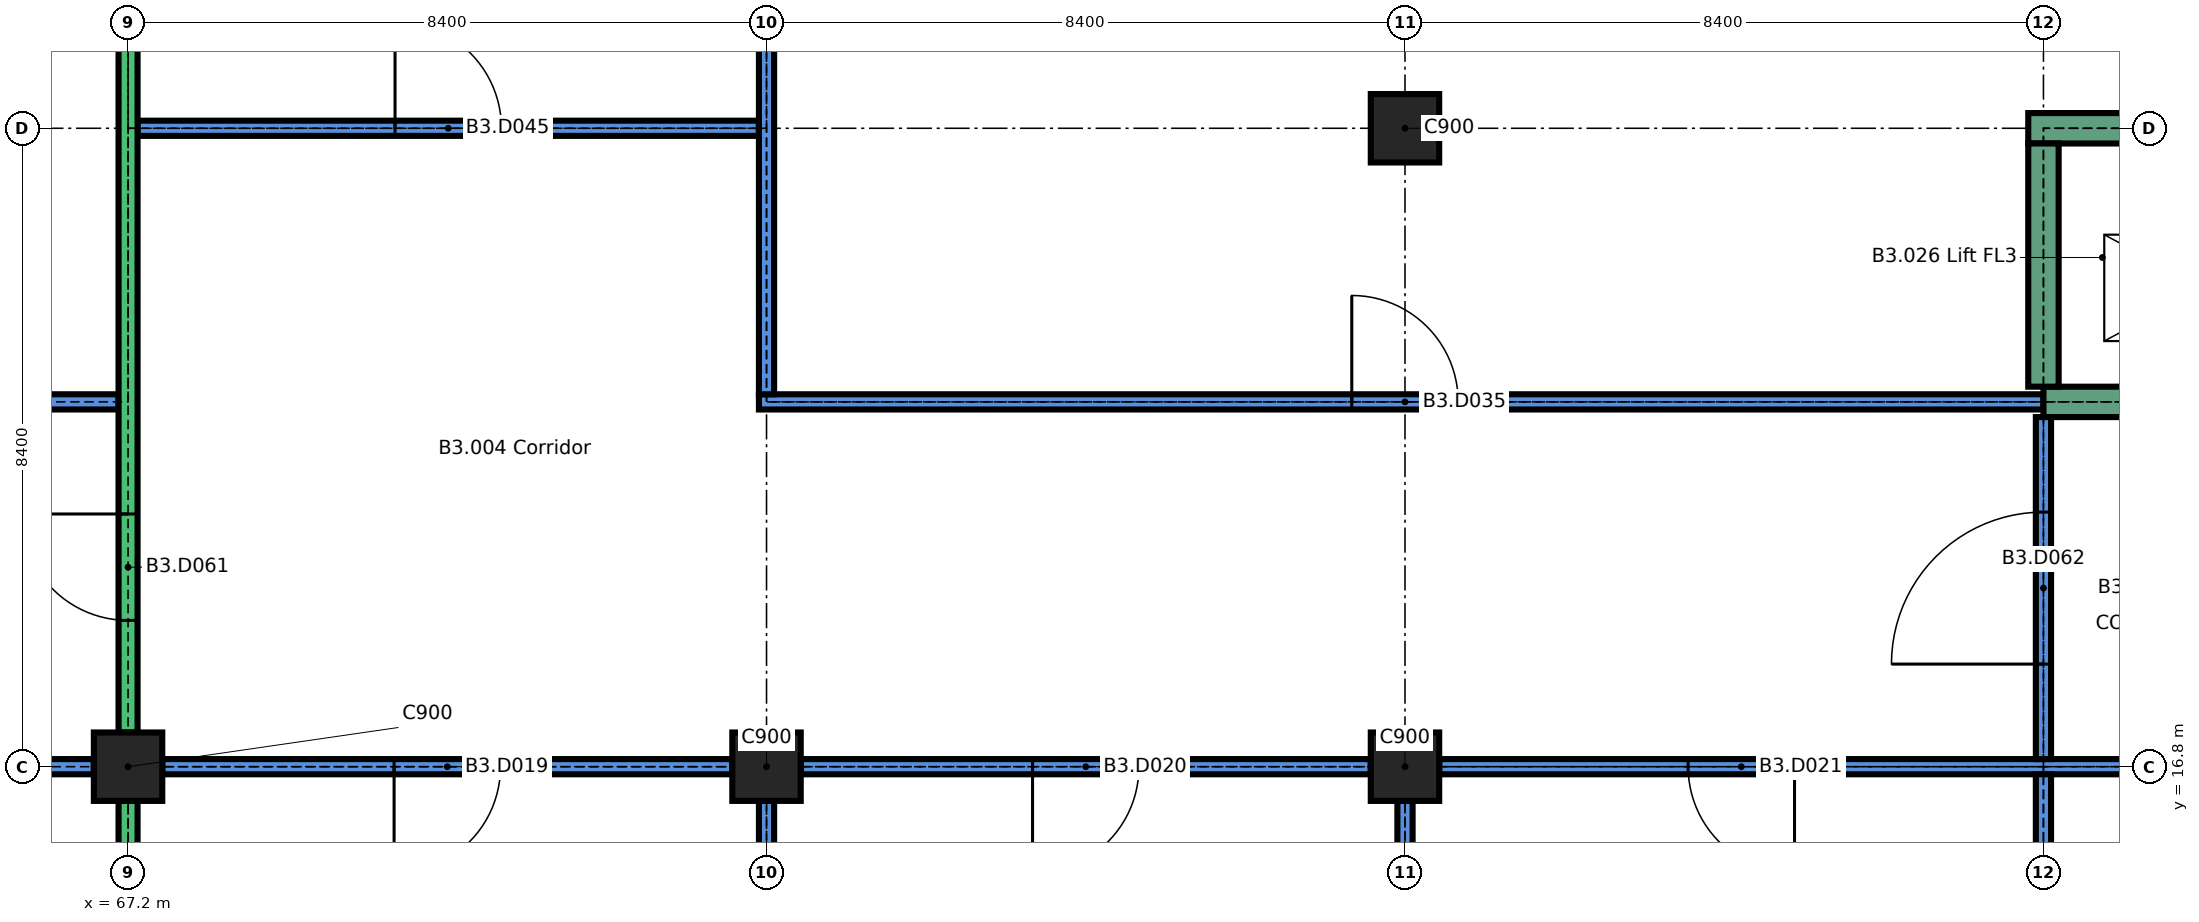
"""IFC4 building model, lengths in metres.
Left out: names, types, materials, properties, quantities, classifications, styles, units other than length and angle.
Written with IfcOpenShell. Run it as: python <this file> out.ifc"""

import sys

from ifc_helpers import new_model, si_unit, direction, frame, frame_2d, origin, origin_2d, place, context, subcontext, project, spatial, rectangle, extrude, element, fill, save


model = new_model("IFC4")
c1 = context("Model", 3, precision=1e-05, world=origin(), true_north=direction((0.0, 1.0)))
c2 = subcontext(c1, "Body", "Model", "MODEL_VIEW")
j1 = project(units=[si_unit("LENGTHUNIT", "METRE"), si_unit("PLANEANGLEUNIT", "RADIAN")], contexts=[c1])
p1 = place(None, origin())
s1 = spatial("IfcSite", under=j1, at=p1, CompositionType="ELEMENT")
p2 = place(p1, origin())
s2 = spatial("IfcBuilding", under=s1, at=p2, CompositionType="ELEMENT")
p3 = place(p2, frame((0.0, 0.0, -11.4)))
s3 = spatial("IfcBuildingStorey", under=s2, at=p3, CompositionType="ELEMENT", Elevation=-11.4)
for number, where, z_axis, x_axis in (
    (1, (67.2, 16.8, 0.0), (0.0, 0.0, 1.0), (1.0, 0.0, 0.0)),
    (2, (75.6, 16.8, 0.0), (0.0, 0.0, 1.0), (1.0, 0.0, 0.0)),
    (3, (84.0, 16.8, 0.0), (0.0, 0.0, 1.0), (1.0, 0.0, 0.0)),
    (4, (84.0, 25.2, 0.0), (0.0, 0.0, 1.0), (1.0, 0.0, 0.0)),
):
    element("IfcColumn", number, at=place(p3, frame(where, z_axis=z_axis, x_axis=x_axis)), inside=s3, PredefinedType="COLUMN", context=c2, shape_type="SweptSolid", body=[
        extrude(rectangle(XDim=0.9, YDim=0.9, at=origin_2d()), origin(), (0.0, 0.0, 1.0), 3.2),
    ])
p4 = place(p3, frame((59.25, 16.8, 0.0), z_axis=(0.0, 0.0, 1.0), x_axis=(1.0, 0.0, 0.0)))
e5 = element("IfcWall", 5, at=p4, inside=s3, PredefinedType="PARTITIONING", context=c2, shape_type="SweptSolid", body=[
    extrude(rectangle(XDim=7.5, YDim=0.2, at=frame_2d((3.75, 0.0))), origin(), (0.0, 0.0, 1.0), 3.2),
])
p5 = place(p4, frame((3.05, 0.0, 0.0)))
e6 = element("IfcOpeningElement", 6, at=p5, cuts=e5, PredefinedType="OPENING", context=c2, shape_type="SweptSolid", body=[
    extrude(rectangle(XDim=1.4, YDim=2.1, at=frame_2d((0.7, 1.05))), frame((0.0, 0.11, 0.0), z_axis=(0.0, -1.0, 0.0), x_axis=(1.0, 0.0, 0.0)), (0.0, 0.0, 1.0), 0.22),
])
p6 = place(p3, frame((67.65, 16.8, 0.0), z_axis=(0.0, 0.0, 1.0), x_axis=(1.0, 0.0, 0.0)))
e7 = element("IfcWall", 7, at=p6, inside=s3, PredefinedType="PARTITIONING", context=c2, shape_type="SweptSolid", body=[
    extrude(rectangle(XDim=7.5, YDim=0.2, at=frame_2d((3.75, 0.0))), origin(), (0.0, 0.0, 1.0), 3.2),
])
p7 = place(p6, frame((3.05, 0.0, 0.0)))
e8 = element("IfcOpeningElement", 8, at=p7, cuts=e7, PredefinedType="OPENING", context=c2, shape_type="SweptSolid", body=[
    extrude(rectangle(XDim=1.4, YDim=2.1, at=frame_2d((0.7, 1.05))), frame((0.0, 0.11, 0.0), z_axis=(0.0, -1.0, 0.0), x_axis=(1.0, 0.0, 0.0)), (0.0, 0.0, 1.0), 0.22),
])
p8 = place(p3, frame((76.05, 16.8, 0.0), z_axis=(0.0, 0.0, 1.0), x_axis=(1.0, 0.0, 0.0)))
e9 = element("IfcWall", 9, at=p8, inside=s3, PredefinedType="PARTITIONING", context=c2, shape_type="SweptSolid", body=[
    extrude(rectangle(XDim=7.5, YDim=0.2, at=frame_2d((3.75, 0.0))), origin(), (0.0, 0.0, 1.0), 3.2),
])
p9 = place(p8, frame((3.05, 0.0, 0.0)))
e10 = element("IfcOpeningElement", 10, at=p9, cuts=e9, PredefinedType="OPENING", context=c2, shape_type="SweptSolid", body=[
    extrude(rectangle(XDim=1.4, YDim=2.1, at=frame_2d((0.7, 1.05))), frame((0.0, 0.11, 0.0), z_axis=(0.0, -1.0, 0.0), x_axis=(1.0, 0.0, 0.0)), (0.0, 0.0, 1.0), 0.22),
])
p10 = place(p3, frame((84.45, 16.8, 0.0), z_axis=(0.0, 0.0, 1.0), x_axis=(1.0, 0.0, 0.0)))
e11 = element("IfcWall", 11, at=p10, inside=s3, PredefinedType="PARTITIONING", context=c2, shape_type="SweptSolid", body=[
    extrude(rectangle(XDim=15.9, YDim=0.2, at=frame_2d((7.95, 0.0))), origin(), (0.0, 0.0, 1.0), 3.2),
])
p11 = place(p10, frame((3.275, 0.0, 0.0)))
e12 = element("IfcOpeningElement", 12, at=p11, cuts=e11, PredefinedType="OPENING", context=c2, shape_type="SweptSolid", body=[
    extrude(rectangle(XDim=1.4, YDim=2.1, at=frame_2d((0.7, 1.05))), frame((0.0, 0.11, 0.0), z_axis=(0.0, -1.0, 0.0), x_axis=(1.0, 0.0, 0.0)), (0.0, 0.0, 1.0), 0.22),
])
p12 = place(p10, frame((13.325, 0.0, 0.0)))
e13 = element("IfcOpeningElement", 13, at=p12, cuts=e11, PredefinedType="OPENING", context=c2, shape_type="SweptSolid", body=[
    extrude(rectangle(XDim=1.4, YDim=2.1, at=frame_2d((0.7, 1.05))), frame((0.0, 0.11, 0.0), z_axis=(0.0, -1.0, 0.0), x_axis=(1.0, 0.0, 0.0)), (0.0, 0.0, 1.0), 0.22),
])
p13 = place(p3, frame((58.7, 21.6, 0.0), z_axis=(0.0, 0.0, 1.0), x_axis=(1.0, 0.0, 0.0)))
e14 = element("IfcWall", 14, at=p13, inside=s3, PredefinedType="PARTITIONING", context=c2, shape_type="SweptSolid", body=[
    extrude(rectangle(XDim=8.375, YDim=0.2, at=frame_2d((4.188, 0.0))), origin(), (0.0, 0.0, 1.0), 3.2),
])
p14 = place(p13, frame((3.538, 0.0, 0.0)))
e15 = element("IfcOpeningElement", 15, at=p14, cuts=e14, PredefinedType="OPENING", context=c2, shape_type="SweptSolid", body=[
    extrude(rectangle(XDim=1.4, YDim=2.1, at=frame_2d((0.7, 1.05))), frame((0.0, 0.11, 0.0), z_axis=(0.0, -1.0, 0.0), x_axis=(1.0, 0.0, 0.0)), (0.0, 0.0, 1.0), 0.22),
])
p15 = place(p3, frame((75.5, 21.6, 0.0), z_axis=(0.0, 0.0, 1.0), x_axis=(1.0, 0.0, 0.0)))
e16 = element("IfcWall", 16, at=p15, inside=s3, PredefinedType="PARTITIONING", context=c2, shape_type="SweptSolid", body=[
    extrude(rectangle(XDim=16.9, YDim=0.2, at=frame_2d((8.45, 0.0))), origin(), (0.0, 0.0, 1.0), 3.2),
])
p16 = place(p15, frame((7.8, 0.0, 0.0)))
e17 = element("IfcOpeningElement", 17, at=p16, cuts=e16, PredefinedType="OPENING", context=c2, shape_type="SweptSolid", body=[
    extrude(rectangle(XDim=1.4, YDim=2.1, at=frame_2d((0.7, 1.05))), frame((0.0, 0.11, 0.0), z_axis=(0.0, -1.0, 0.0), x_axis=(1.0, 0.0, 0.0)), (0.0, 0.0, 1.0), 0.22),
])
p17 = place(p3, frame((92.4, 21.6, 0.0), z_axis=(0.0, 0.0, 1.0), x_axis=(1.0, 0.0, 0.0)))
e18 = element("IfcWall", 18, at=p17, inside=s3, PredefinedType="SHEAR", context=c2, shape_type="SweptSolid", body=[
    extrude(rectangle(XDim=4.2, YDim=0.4, at=frame_2d((2.1, 0.0))), origin(), (0.0, 0.0, 1.0), 3.2),
])
p18 = place(p17, frame((1.55, 0.0, 0.0)))
e19 = element("IfcOpeningElement", 19, at=p18, cuts=e18, PredefinedType="OPENING", context=c2, shape_type="SweptSolid", body=[
    extrude(rectangle(XDim=1.1, YDim=2.1, at=frame_2d((0.55, 1.05))), frame((0.0, 0.21, 0.0), z_axis=(0.0, -1.0, 0.0), x_axis=(1.0, 0.0, 0.0)), (0.0, 0.0, 1.0), 0.42),
])
p19 = place(p3, frame((67.325, 25.2, 0.0), z_axis=(0.0, 0.0, 1.0), x_axis=(1.0, 0.0, 0.0)))
e20 = element("IfcWall", 20, at=p19, inside=s3, PredefinedType="PARTITIONING", context=c2, shape_type="SweptSolid", body=[
    extrude(rectangle(XDim=8.175, YDim=0.2, at=frame_2d((4.087, 0.0))), origin(), (0.0, 0.0, 1.0), 3.2),
])
p20 = place(p19, frame((3.387, 0.0, 0.0)))
e21 = element("IfcOpeningElement", 21, at=p20, cuts=e20, PredefinedType="OPENING", context=c2, shape_type="SweptSolid", body=[
    extrude(rectangle(XDim=1.4, YDim=2.1, at=frame_2d((0.7, 1.05))), frame((0.0, 0.11, 0.0), z_axis=(0.0, -1.0, 0.0), x_axis=(1.0, 0.0, 0.0)), (0.0, 0.0, 1.0), 0.22),
])
p21 = place(p3, frame((92.2, 25.2, 0.0), z_axis=(0.0, 0.0, 1.0), x_axis=(1.0, 0.0, 0.0)))
e22 = element("IfcWall", 22, at=p21, inside=s3, PredefinedType="SHEAR", context=c2, shape_type="SweptSolid", body=[
    extrude(rectangle(XDim=4.6, YDim=0.4, at=frame_2d((2.3, 0.0))), origin(), (0.0, 0.0, 1.0), 3.2),
])
p22 = place(p3, frame((67.2, 8.85, 0.0), z_axis=(0.0, 0.0, 1.0), x_axis=(0.0, 1.0, 0.0)))
e23 = element("IfcWall", 23, at=p22, inside=s3, PredefinedType="SOLIDWALL", context=c2, shape_type="SweptSolid", body=[
    extrude(rectangle(XDim=7.5, YDim=0.25, at=frame_2d((3.75, 0.0))), origin(), (0.0, 0.0, 1.0), 3.2),
])
p23 = place(p3, frame((67.2, 17.25, 0.0), z_axis=(0.0, 0.0, 1.0), x_axis=(0.0, 1.0, 0.0)))
e24 = element("IfcWall", 24, at=p23, inside=s3, PredefinedType="SOLIDWALL", context=c2, shape_type="SweptSolid", body=[
    extrude(rectangle(XDim=12.75, YDim=0.25, at=frame_2d((6.375, 0.0))), origin(), (0.0, 0.0, 1.0), 3.2),
])
p24 = place(p23, frame((1.475, 0.0, 0.0)))
e25 = element("IfcOpeningElement", 25, at=p24, cuts=e24, PredefinedType="OPENING", context=c2, shape_type="SweptSolid", body=[
    extrude(rectangle(XDim=1.4, YDim=2.1, at=frame_2d((0.7, 1.05))), frame((0.0, 0.135, 0.0), z_axis=(0.0, -1.0, 0.0), x_axis=(1.0, 0.0, 0.0)), (0.0, 0.0, 1.0), 0.27),
])
p25 = place(p3, frame((75.6, 8.85, 0.0), z_axis=(0.0, 0.0, 1.0), x_axis=(0.0, 1.0, 0.0)))
e26 = element("IfcWall", 26, at=p25, inside=s3, PredefinedType="PARTITIONING", context=c2, shape_type="SweptSolid", body=[
    extrude(rectangle(XDim=7.5, YDim=0.2, at=frame_2d((3.75, 0.0))), origin(), (0.0, 0.0, 1.0), 3.2),
])
p26 = place(p3, frame((75.6, 21.7, 0.0), z_axis=(0.0, 0.0, 1.0), x_axis=(0.0, 1.0, 0.0)))
e27 = element("IfcWall", 27, at=p26, inside=s3, PredefinedType="PARTITIONING", context=c2, shape_type="SweptSolid", body=[
    extrude(rectangle(XDim=8.3, YDim=0.2, at=frame_2d((4.15, 0.0))), origin(), (0.0, 0.0, 1.0), 3.2),
])
p27 = place(p3, frame((84.0, 8.85, 0.0), z_axis=(0.0, 0.0, 1.0), x_axis=(0.0, 1.0, 0.0)))
e28 = element("IfcWall", 28, at=p27, inside=s3, PredefinedType="PARTITIONING", context=c2, shape_type="SweptSolid", body=[
    extrude(rectangle(XDim=7.5, YDim=0.2, at=frame_2d((3.75, 0.0))), origin(), (0.0, 0.0, 1.0), 3.2),
])
p28 = place(p3, frame((92.4, 8.85, 0.0), z_axis=(0.0, 0.0, 1.0), x_axis=(0.0, 1.0, 0.0)))
e29 = element("IfcWall", 29, at=p28, inside=s3, PredefinedType="PARTITIONING", context=c2, shape_type="SweptSolid", body=[
    extrude(rectangle(XDim=7.85, YDim=0.2, at=frame_2d((3.925, 0.0))), origin(), (0.0, 0.0, 1.0), 3.2),
])
p29 = place(p3, frame((92.4, 16.9, 0.0), z_axis=(0.0, 0.0, 1.0), x_axis=(0.0, 1.0, 0.0)))
e30 = element("IfcWall", 30, at=p29, inside=s3, PredefinedType="PARTITIONING", context=c2, shape_type="SweptSolid", body=[
    extrude(rectangle(XDim=4.5, YDim=0.2, at=frame_2d((2.25, 0.0))), origin(), (0.0, 0.0, 1.0), 3.2),
])
p30 = place(p29, frame((1.25, 0.0, 0.0)))
e31 = element("IfcOpeningElement", 31, at=p30, cuts=e30, PredefinedType="OPENING", context=c2, shape_type="SweptSolid", body=[
    extrude(rectangle(XDim=2.0, YDim=2.4, at=frame_2d((1.0, 1.2))), frame((0.0, 0.11, 0.0), z_axis=(0.0, -1.0, 0.0), x_axis=(1.0, 0.0, 0.0)), (0.0, 0.0, 1.0), 0.22),
])
p31 = place(p3, frame((92.4, 21.8, 0.0), z_axis=(0.0, 0.0, 1.0), x_axis=(0.0, 1.0, 0.0)))
e32 = element("IfcWall", 32, at=p31, inside=s3, PredefinedType="SHEAR", context=c2, shape_type="SweptSolid", body=[
    extrude(rectangle(XDim=3.2, YDim=0.4, at=frame_2d((1.6, 0.0))), origin(), (0.0, 0.0, 1.0), 3.2),
])
p32 = place(p7, origin())
e33 = element("IfcDoor", 33, at=p32, inside=s3, OperationType="SINGLE_SWING_LEFT", PredefinedType="DOOR", context=c2, shape_type="SweptSolid", body=[
    extrude(rectangle(XDim=1.4, YDim=2.1, at=frame_2d((0.7, 1.05))), frame((0.0, 0.025, 0.0), z_axis=(0.0, -1.0, 0.0), x_axis=(1.0, 0.0, 0.0)), (0.0, 0.0, 1.0), 0.05),
])
fill(e8, e33)
p33 = place(p9, origin())
e34 = element("IfcDoor", 34, at=p33, inside=s3, OperationType="SINGLE_SWING_LEFT", PredefinedType="DOOR", context=c2, shape_type="SweptSolid", body=[
    extrude(rectangle(XDim=1.4, YDim=2.1, at=frame_2d((0.7, 1.05))), frame((0.0, 0.025, 0.0), z_axis=(0.0, -1.0, 0.0), x_axis=(1.0, 0.0, 0.0)), (0.0, 0.0, 1.0), 0.05),
])
fill(e10, e34)
p34 = place(p11, origin())
e35 = element("IfcDoor", 35, at=p34, inside=s3, OperationType="SINGLE_SWING_RIGHT", PredefinedType="DOOR", context=c2, shape_type="SweptSolid", body=[
    extrude(rectangle(XDim=1.4, YDim=2.1, at=frame_2d((0.7, 1.05))), frame((0.0, 0.025, 0.0), z_axis=(0.0, -1.0, 0.0), x_axis=(1.0, 0.0, 0.0)), (0.0, 0.0, 1.0), 0.05),
])
fill(e12, e35)
p35 = place(p16, origin())
e36 = element("IfcDoor", 36, at=p35, inside=s3, OperationType="SINGLE_SWING_RIGHT", PredefinedType="DOOR", context=c2, shape_type="SweptSolid", body=[
    extrude(rectangle(XDim=1.4, YDim=2.1, at=frame_2d((0.7, 1.05))), frame((0.0, 0.025, 0.0), z_axis=(0.0, -1.0, 0.0), x_axis=(1.0, 0.0, 0.0)), (0.0, 0.0, 1.0), 0.05),
])
fill(e17, e36)
p36 = place(p20, origin())
e37 = element("IfcDoor", 37, at=p36, inside=s3, OperationType="SINGLE_SWING_RIGHT", PredefinedType="DOOR", context=c2, shape_type="SweptSolid", body=[
    extrude(rectangle(XDim=1.4, YDim=2.1, at=frame_2d((0.7, 1.05))), frame((0.0, 0.03, 0.0), z_axis=(0.0, -1.0, 0.0), x_axis=(1.0, 0.0, 0.0)), (0.0, 0.0, 1.0), 0.06),
])
fill(e21, e37)
p37 = place(p24, origin())
e38 = element("IfcDoor", 38, at=p37, inside=s3, OperationType="SINGLE_SWING_LEFT", PredefinedType="DOOR", context=c2, shape_type="SweptSolid", body=[
    extrude(rectangle(XDim=1.4, YDim=2.1, at=frame_2d((0.7, 1.05))), frame((0.0, 0.03, 0.0), z_axis=(0.0, -1.0, 0.0), x_axis=(1.0, 0.0, 0.0)), (0.0, 0.0, 1.0), 0.06),
])
fill(e25, e38)
p38 = place(p30, origin())
e39 = element("IfcDoor", 39, at=p38, inside=s3, OperationType="SINGLE_SWING_RIGHT", PredefinedType="DOOR", context=c2, shape_type="SweptSolid", body=[
    extrude(rectangle(XDim=2.0, YDim=2.4, at=frame_2d((1.0, 1.2))), frame((0.0, 0.03, 0.0), z_axis=(0.0, -1.0, 0.0), x_axis=(1.0, 0.0, 0.0)), (0.0, 0.0, 1.0), 0.06),
])
fill(e31, e39)
save(model, sys.argv[1])
